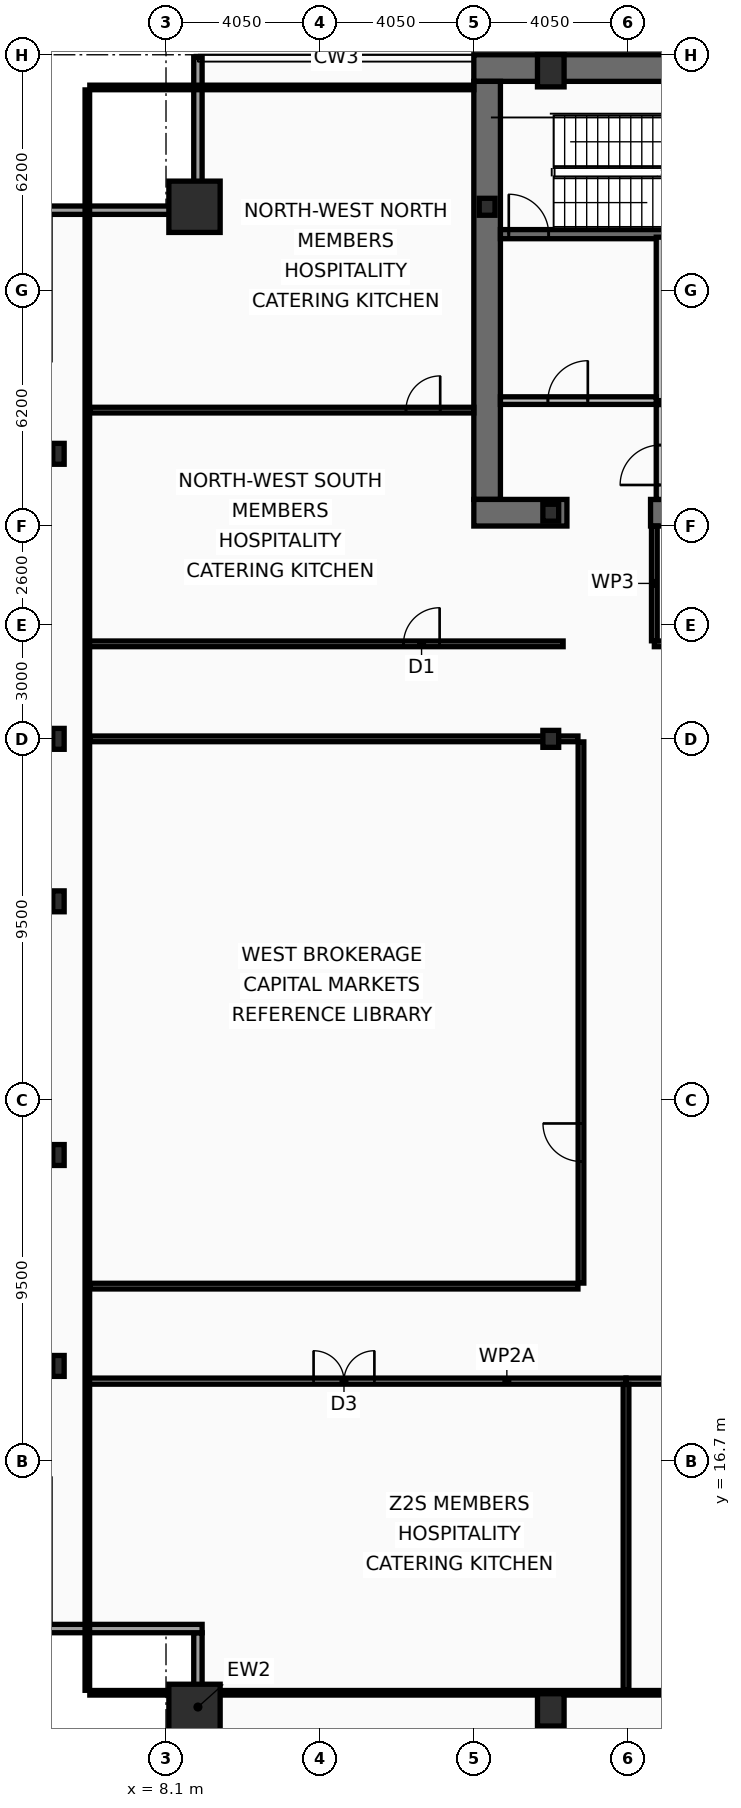
"""IFC4 building model, lengths in metres.
Left out: names, types, materials, properties, quantities, classifications, styles, units other than length and angle.
Written with IfcOpenShell. Run it as: python <this file> out.ifc"""

import sys

from ifc_helpers import new_model, si_unit, direction, frame, frame_2d, origin, origin_2d, place, context, subcontext, project, spatial, rectangle, hollow_rectangle, i_section, extrude, element, fill, save


model = new_model("IFC4")
c1 = context("Model", 3, precision=1e-05, world=origin(), true_north=direction((0.0, 1.0)))
c2 = subcontext(c1, "Body", "Model", "MODEL_VIEW")
j1 = project(units=[si_unit("LENGTHUNIT", "METRE"), si_unit("PLANEANGLEUNIT", "RADIAN")], contexts=[c1])
p1 = place(None, origin())
s1 = spatial("IfcSite", under=j1, at=p1, CompositionType="ELEMENT")
p2 = place(p1, origin())
s2 = spatial("IfcBuilding", under=s1, at=p2, CompositionType="ELEMENT")
p3 = place(p2, frame((0.0, 0.0, 147.0)))
s3 = spatial("IfcBuildingStorey", under=s2, at=p3, CompositionType="ELEMENT", Elevation=147.0)
p4 = place(p3, frame((16.2, 53.35, 0.0), z_axis=(0.0, 0.0, 1.0), x_axis=(1.0, 0.0, 0.0)))
e1 = element("IfcWall", 1, at=p4, inside=s3, PredefinedType="SHEAR", context=c2, shape_type="SweptSolid", body=[
    extrude(rectangle(XDim=40.5, YDim=0.7, at=frame_2d((20.25, 0.0))), origin(), (0.0, 0.0, 1.0), 3.44),
])
p5 = place(p3, frame((16.55, 42.0, 0.0), z_axis=(0.0, 0.0, 1.0), x_axis=(0.0, 1.0, 0.0)))
e2 = element("IfcWall", 2, at=p5, inside=s3, PredefinedType="SHEAR", context=c2, shape_type="SweptSolid", body=[
    extrude(rectangle(XDim=11.0, YDim=0.7, at=frame_2d((5.5, 0.0))), origin(), (0.0, 0.0, 1.0), 3.44),
])
p6 = place(p3, frame((18.65, 41.65, 0.0), z_axis=(0.0, 0.0, 1.0), x_axis=(-1.0, 0.0, 0.0)))
e3 = element("IfcWall", 3, at=p6, inside=s3, PredefinedType="SHEAR", context=c2, shape_type="SweptSolid", body=[
    extrude(rectangle(XDim=2.45, YDim=0.7, at=frame_2d((1.225, 0.0))), origin(), (0.0, 0.0, 1.0), 3.44),
])
p7 = place(p3, frame((32.3, 41.65, 0.0), z_axis=(0.0, 0.0, 1.0), x_axis=(-1.0, 0.0, 0.0)))
e4 = element("IfcWall", 4, at=p7, inside=s3, PredefinedType="SHEAR", context=c2, shape_type="SweptSolid", body=[
    extrude(rectangle(XDim=11.45, YDim=0.7, at=frame_2d((5.725, 0.0))), origin(), (0.0, 0.0, 1.0), 3.44),
])
p8 = place(p3, frame((16.9, 48.98, 0.0), z_axis=(0.0, 0.0, 1.0), x_axis=(1.0, 0.0, 0.0)))
e5 = element("IfcWall", 5, at=p8, inside=s3, PredefinedType="SHEAR", context=c2, shape_type="SweptSolid", body=[
    extrude(rectangle(XDim=7.32, YDim=0.24, at=frame_2d((3.66, 0.0))), origin(), (0.0, 0.0, 1.0), 3.44),
])
p9 = place(p8, frame((0.22, 0.0, 0.0)))
e6 = element("IfcOpeningElement", 6, at=p9, cuts=e5, PredefinedType="OPENING", context=c2, shape_type="SweptSolid", body=[
    extrude(rectangle(XDim=1.05, YDim=2.15, at=frame_2d((0.525, 1.075))), frame((0.0, 0.13, 0.0), z_axis=(0.0, -1.0, 0.0), x_axis=(1.0, 0.0, 0.0)), (0.0, 0.0, 1.0), 0.26),
])
for number, where, z_axis, x_axis in (
    (7, (8.85, 10.15, 0.0), (0.0, 0.0, 1.0), (1.0, 0.0, 0.0)),
    (8, (8.85, 49.7, 0.0), (0.0, 0.0, 1.0), (1.0, 0.0, 0.0)),
):
    element("IfcColumn", number, at=place(p3, frame(where, z_axis=z_axis, x_axis=x_axis)), inside=s3, PredefinedType="COLUMN", context=c2, shape_type="SweptSolid", body=[
        extrude(hollow_rectangle(XDim=1.35, YDim=1.35, WallThickness=0.065, at=origin_2d()), origin(), (0.0, 0.0, 1.0), 3.6),
    ])
for number, where, z_axis, x_axis in (
    (9, (18.225, 10.15, 0.0), (0.0, 0.0, 1.0), (1.0, 0.0, 0.0)),
    (10, (18.225, 53.28, 0.0), (0.0, 0.0, 1.0), (1.0, 0.0, 0.0)),
):
    element("IfcColumn", number, at=place(p3, frame(where, z_axis=z_axis, x_axis=x_axis)), inside=s3, PredefinedType="COLUMN", context=c2, shape_type="SweptSolid", body=[
        extrude(hollow_rectangle(XDim=0.7, YDim=0.85, WallThickness=0.05, at=origin_2d()), origin(), (0.0, 0.0, 1.0), 3.6),
    ])
for number, where, z_axis, x_axis in (
    (11, (5.27, 19.2, 0.0), (0.0, 0.0, 1.0), (1.0, 0.0, 0.0)),
    (12, (5.27, 24.75, 0.0), (0.0, 0.0, 1.0), (1.0, 0.0, 0.0)),
    (13, (5.27, 31.425, 0.0), (0.0, 0.0, 1.0), (1.0, 0.0, 0.0)),
    (14, (5.27, 35.7, 0.0), (0.0, 0.0, 1.0), (1.0, 0.0, 0.0)),
    (15, (5.27, 43.2, 0.0), (0.0, 0.0, 1.0), (1.0, 0.0, 0.0)),
):
    element("IfcColumn", number, at=place(p3, frame(where, z_axis=z_axis, x_axis=x_axis)), inside=s3, PredefinedType="COLUMN", context=c2, shape_type="SweptSolid", body=[
        extrude(i_section(OverallWidth=0.3, OverallDepth=0.55, WebThickness=0.015, FlangeThickness=0.029, at=origin_2d()), origin(), (0.0, 0.0, 1.0), 3.6),
    ])
for number, where, z_axis, x_axis in (
    (16, (16.55, 49.7, 0.0), (0.0, 0.0, 1.0), (1.0, 0.0, 0.0)),
    (17, (18.225, 35.7, 0.0), (0.0, 0.0, 1.0), (1.0, 0.0, 0.0)),
    (18, (18.225, 41.65, 0.0), (0.0, 0.0, 1.0), (1.0, 0.0, 0.0)),
):
    element("IfcColumn", number, at=place(p3, frame(where, z_axis=z_axis, x_axis=x_axis)), inside=s3, PredefinedType="COLUMN", context=c2, shape_type="SweptSolid", body=[
        extrude(i_section(OverallWidth=0.416, OverallDepth=0.446, WebThickness=0.039, FlangeThickness=0.063, at=origin_2d()), origin(), (0.0, 0.0, 1.0), 3.6),
    ])
p10 = place(p3, frame((8.94, 8.27, 0.0), z_axis=(0.0, 0.0, 1.0), x_axis=(0.0, 1.0, 0.0)))
e19 = element("IfcWall", 19, at=p10, inside=s3, PredefinedType="SOLIDWALL", context=c2, shape_type="SweptSolid", body=[
    extrude(rectangle(XDim=3.91, YDim=0.22, at=frame_2d((1.955, 0.0))), origin(), (0.0, 0.0, 1.0), 2.83),
])
for number, where, z_axis, x_axis in (
    (20, (9.05, 12.29, 0.0), (0.0, 0.0, 1.0), (-1.0, 0.0, 0.0)),
    (21, (4.83, 49.61, 0.0), (0.0, 0.0, 1.0), (1.0, 0.0, 0.0)),
):
    element("IfcWall", number, at=place(p3, frame(where, z_axis=z_axis, x_axis=x_axis)), inside=s3, PredefinedType="SOLIDWALL", context=c2, shape_type="SweptSolid", body=[
        extrude(rectangle(XDim=4.22, YDim=0.22, at=frame_2d((2.11, 0.0))), origin(), (0.0, 0.0, 1.0), 2.83),
    ])
p11 = place(p3, frame((8.94, 49.72, 0.0), z_axis=(0.0, 0.0, 1.0), x_axis=(0.0, 1.0, 0.0)))
e22 = element("IfcWall", 22, at=p11, inside=s3, PredefinedType="SOLIDWALL", context=c2, shape_type="SweptSolid", body=[
    extrude(rectangle(XDim=3.91, YDim=0.22, at=frame_2d((1.955, 0.0))), origin(), (0.0, 0.0, 1.0), 2.83),
])
p12 = place(p3, frame((21.1, 44.6, 0.0), z_axis=(0.0, 0.0, 1.0), x_axis=(0.0, 1.0, 0.0)))
e23 = element("IfcWall", 23, at=p12, inside=s3, PredefinedType="PARTITIONING", context=c2, shape_type="SweptSolid", body=[
    extrude(rectangle(XDim=4.3, YDim=0.2, at=frame_2d((2.15, 0.0))), origin(), (0.0, 0.0, 1.0), 3.44),
])
p13 = place(p3, frame((16.9, 44.6, 0.0), z_axis=(0.0, 0.0, 1.0), x_axis=(1.0, 0.0, 0.0)))
e24 = element("IfcWall", 24, at=p13, inside=s3, PredefinedType="PARTITIONING", context=c2, shape_type="SweptSolid", body=[
    extrude(rectangle(XDim=4.1, YDim=0.2, at=frame_2d((2.05, 0.0))), origin(), (0.0, 0.0, 1.0), 3.44),
])
p14 = place(p13, frame((1.25, 0.0, 0.0)))
e25 = element("IfcOpeningElement", 25, at=p14, cuts=e24, PredefinedType="OPENING", context=c2, shape_type="SweptSolid", body=[
    extrude(rectangle(XDim=1.05, YDim=2.15, at=frame_2d((0.525, 1.075))), frame((0.0, 0.11, 0.0), z_axis=(0.0, -1.0, 0.0), x_axis=(1.0, 0.0, 0.0)), (0.0, 0.0, 1.0), 0.22),
])
p15 = place(p3, frame((21.1, 42.0, 0.0), z_axis=(0.0, 0.0, 1.0), x_axis=(0.0, 1.0, 0.0)))
e26 = element("IfcWall", 26, at=p15, inside=s3, PredefinedType="PARTITIONING", context=c2, shape_type="SweptSolid", body=[
    extrude(rectangle(XDim=2.495, YDim=0.2, at=frame_2d((1.248, 0.0))), origin(), (0.0, 0.0, 1.0), 3.44),
])
p16 = place(p15, frame((0.38, 0.0, 0.0)))
e27 = element("IfcOpeningElement", 27, at=p16, cuts=e26, PredefinedType="OPENING", context=c2, shape_type="SweptSolid", body=[
    extrude(rectangle(XDim=1.05, YDim=2.15, at=frame_2d((0.525, 1.075))), frame((0.0, 0.11, 0.0), z_axis=(0.0, -1.0, 0.0), x_axis=(1.0, 0.0, 0.0)), (0.0, 0.0, 1.0), 0.22),
])
p17 = place(p3, frame((20.95, 38.2, 0.0), z_axis=(0.0, 0.0, 1.0), x_axis=(1.0, 0.0, 0.0)))
e28 = element("IfcWall", 28, at=p17, inside=s3, PredefinedType="PARTITIONING", context=c2, shape_type="SweptSolid", body=[
    extrude(rectangle(XDim=4.55, YDim=0.15, at=frame_2d((2.275, 0.0))), origin(), (0.0, 0.0, 1.0), 2.73),
])
p18 = place(p17, frame((0.9, 0.0, 0.0)))
e29 = element("IfcOpeningElement", 29, at=p18, cuts=e28, PredefinedType="OPENING", context=c2, shape_type="SweptSolid", body=[
    extrude(rectangle(XDim=0.95, YDim=2.05, at=frame_2d((0.475, 1.025))), frame((0.0, 0.085, 0.0), z_axis=(0.0, -1.0, 0.0), x_axis=(1.0, 0.0, 0.0)), (0.0, 0.0, 1.0), 0.17),
])
p19 = place(p3, frame((20.95, 38.28, 0.0), z_axis=(0.0, 0.0, 1.0), x_axis=(0.0, 1.0, 0.0)))
e30 = element("IfcWall", 30, at=p19, inside=s3, PredefinedType="PARTITIONING", context=c2, shape_type="SweptSolid", body=[
    extrude(rectangle(XDim=3.02, YDim=0.15, at=frame_2d((1.51, 0.0))), origin(), (0.0, 0.0, 1.0), 3.44),
])
p20 = place(p3, frame((6.03, 38.2, 0.0), z_axis=(0.0, 0.0, 1.0), x_axis=(1.0, 0.0, 0.0)))
e31 = element("IfcWall", 31, at=p20, inside=s3, PredefinedType="PARTITIONING", context=c2, shape_type="SweptSolid", body=[
    extrude(rectangle(XDim=12.52, YDim=0.15, at=frame_2d((6.26, 0.0))), origin(), (0.0, 0.0, 1.0), 2.73),
])
p21 = place(p20, frame((8.32, 0.0, 0.0)))
e32 = element("IfcOpeningElement", 32, at=p21, cuts=e31, PredefinedType="OPENING", context=c2, shape_type="SweptSolid", body=[
    extrude(rectangle(XDim=0.95, YDim=2.05, at=frame_2d((0.475, 1.025))), frame((0.0, 0.085, 0.0), z_axis=(0.0, -1.0, 0.0), x_axis=(1.0, 0.0, 0.0)), (0.0, 0.0, 1.0), 0.17),
])
p22 = place(p3, frame((6.095, 44.35, 0.0), z_axis=(0.0, 0.0, 1.0), x_axis=(1.0, 0.0, 0.0)))
e33 = element("IfcWall", 33, at=p22, inside=s3, PredefinedType="PARTITIONING", context=c2, shape_type="SweptSolid", body=[
    extrude(rectangle(XDim=10.105, YDim=0.15, at=frame_2d((5.052, 0.0))), origin(), (0.0, 0.0, 1.0), 2.83),
])
p23 = place(p22, frame((8.32, 0.0, 0.0)))
e34 = element("IfcOpeningElement", 34, at=p23, cuts=e33, PredefinedType="OPENING", context=c2, shape_type="SweptSolid", body=[
    extrude(rectangle(XDim=0.9, YDim=2.05, at=frame_2d((0.45, 1.025))), frame((0.0, 0.085, 0.0), z_axis=(0.0, -1.0, 0.0), x_axis=(1.0, 0.0, 0.0)), (0.0, 0.0, 1.0), 0.17),
])
p24 = place(p3, frame((6.03, 18.8, 0.0), z_axis=(0.0, 0.0, 1.0), x_axis=(1.0, 0.0, 0.0)))
e35 = element("IfcWall", 35, at=p24, inside=s3, PredefinedType="PARTITIONING", context=c2, shape_type="SweptSolid", body=[
    extrude(rectangle(XDim=14.175, YDim=0.16, at=frame_2d((7.087, 0.0))), origin(), (0.0, 0.0, 1.0), 2.73),
])
p25 = place(p24, frame((5.953, 0.0, 0.0)))
e36 = element("IfcOpeningElement", 36, at=p25, cuts=e35, PredefinedType="OPENING", context=c2, shape_type="SweptSolid", body=[
    extrude(rectangle(XDim=1.6, YDim=2.15, at=frame_2d((0.8, 1.075))), frame((0.0, 0.09, 0.0), z_axis=(0.0, -1.0, 0.0), x_axis=(1.0, 0.0, 0.0)), (0.0, 0.0, 1.0), 0.18),
])
p26 = place(p3, frame((20.205, 18.8, 0.0), z_axis=(0.0, 0.0, 1.0), x_axis=(1.0, 0.0, 0.0)))
e37 = element("IfcWall", 37, at=p26, inside=s3, PredefinedType="PARTITIONING", context=c2, shape_type="SweptSolid", body=[
    extrude(rectangle(XDim=9.831, YDim=0.16, at=frame_2d((4.916, 0.0))), origin(), (0.0, 0.0, 1.0), 2.73),
])
p27 = place(p26, frame((4.129, 0.0, 0.0)))
e38 = element("IfcOpeningElement", 38, at=p27, cuts=e37, PredefinedType="OPENING", context=c2, shape_type="SweptSolid", body=[
    extrude(rectangle(XDim=1.0, YDim=2.05, at=frame_2d((0.5, 1.025))), frame((0.0, 0.09, 0.0), z_axis=(0.0, -1.0, 0.0), x_axis=(1.0, 0.0, 0.0)), (0.0, 0.0, 1.0), 0.18),
])
p28 = place(p3, frame((20.205, 10.665, 0.0), z_axis=(0.0, 0.0, 1.0), x_axis=(0.0, 1.0, 0.0)))
e39 = element("IfcWall", 39, at=p28, inside=s3, PredefinedType="PARTITIONING", context=c2, shape_type="SweptSolid", body=[
    extrude(rectangle(XDim=8.05, YDim=0.15, at=frame_2d((4.025, 0.0))), origin(), (0.0, 0.0, 1.0), 2.93),
])
p29 = place(p3, frame((19.02, 21.38, 0.0), z_axis=(0.0, 0.0, 1.0), x_axis=(0.0, 1.0, 0.0)))
e40 = element("IfcWall", 40, at=p29, inside=s3, PredefinedType="PARTITIONING", context=c2, shape_type="SweptSolid", body=[
    extrude(rectangle(XDim=14.24, YDim=0.15, at=frame_2d((7.12, 0.0))), origin(), (0.0, 0.0, 1.0), 2.93),
])
p30 = place(p29, frame((3.2, 0.0, 0.0)))
e41 = element("IfcOpeningElement", 41, at=p30, cuts=e40, PredefinedType="OPENING", context=c2, shape_type="SweptSolid", body=[
    extrude(rectangle(XDim=1.0, YDim=2.05, at=frame_2d((0.5, 1.025))), frame((0.0, 0.085, 0.0), z_axis=(0.0, -1.0, 0.0), x_axis=(1.0, 0.0, 0.0)), (0.0, 0.0, 1.0), 0.17),
])
for number, where, z_axis, x_axis in (
    (42, (6.095, 21.3, 0.0), (0.0, 0.0, 1.0), (1.0, 0.0, 0.0)),
    (43, (6.095, 35.7, 0.0), (0.0, 0.0, 1.0), (1.0, 0.0, 0.0)),
):
    element("IfcWall", number, at=place(p3, frame(where, z_axis=z_axis, x_axis=x_axis)), inside=s3, PredefinedType="PARTITIONING", context=c2, shape_type="SweptSolid", body=[
        extrude(rectangle(XDim=12.845, YDim=0.15, at=frame_2d((6.422, 0.0))), origin(), (0.0, 0.0, 1.0), 2.73),
    ])
p31 = place(p3, frame((6.03, 10.665, 0.0), z_axis=(0.0, 0.0, 1.0), x_axis=(0.0, 1.0, 0.0)))
e44 = element("IfcWall", 44, at=p31, inside=s3, PredefinedType="PARTITIONING", context=c2, shape_type="SweptSolid", body=[
    extrude(rectangle(XDim=42.11, YDim=0.12, at=frame_2d((21.055, 0.0))), origin(), (0.0, 0.0, 1.0), 2.73),
])
p32 = place(p3, frame((6.095, 52.84, 0.0), z_axis=(0.0, 0.0, 1.0), x_axis=(1.0, 0.0, 0.0)))
e45 = element("IfcWall", 45, at=p32, inside=s3, PredefinedType="PARTITIONING", context=c2, shape_type="SweptSolid", body=[
    extrude(rectangle(XDim=10.105, YDim=0.12, at=frame_2d((5.052, 0.0))), origin(), (0.0, 0.0, 1.0), 3.44),
])
p33 = place(p3, frame((6.095, 10.6, 0.0), z_axis=(0.0, 0.0, 1.0), x_axis=(1.0, 0.0, 0.0)))
e46 = element("IfcWall", 46, at=p33, inside=s3, PredefinedType="PARTITIONING", context=c2, shape_type="SweptSolid", body=[
    extrude(rectangle(XDim=60.71, YDim=0.12, at=frame_2d((30.355, 0.0))), origin(), (0.0, 0.0, 1.0), 2.73),
])
p34 = place(p9, origin())
e47 = element("IfcDoor", 47, at=p34, inside=s3, OperationType="SINGLE_SWING_LEFT", PredefinedType="DOOR", context=c2, shape_type="SweptSolid", body=[
    extrude(rectangle(XDim=1.05, YDim=2.15, at=frame_2d((0.525, 1.075))), frame((0.0, 0.025, 0.0), z_axis=(0.0, -1.0, 0.0), x_axis=(1.0, 0.0, 0.0)), (0.0, 0.0, 1.0), 0.05),
])
fill(e6, e47)
p35 = place(p14, origin())
e48 = element("IfcDoor", 48, at=p35, inside=s3, OperationType="SINGLE_SWING_RIGHT", PredefinedType="DOOR", context=c2, shape_type="SweptSolid", body=[
    extrude(rectangle(XDim=1.05, YDim=2.15, at=frame_2d((0.525, 1.075))), frame((0.0, 0.025, 0.0), z_axis=(0.0, -1.0, 0.0), x_axis=(1.0, 0.0, 0.0)), (0.0, 0.0, 1.0), 0.05),
])
fill(e25, e48)
p36 = place(p16, origin())
e49 = element("IfcDoor", 49, at=p36, inside=s3, OperationType="SINGLE_SWING_LEFT", PredefinedType="DOOR", context=c2, shape_type="SweptSolid", body=[
    extrude(rectangle(XDim=1.05, YDim=2.15, at=frame_2d((0.525, 1.075))), frame((0.0, 0.025, 0.0), z_axis=(0.0, -1.0, 0.0), x_axis=(1.0, 0.0, 0.0)), (0.0, 0.0, 1.0), 0.05),
])
fill(e27, e49)
p37 = place(p21, origin())
e50 = element("IfcDoor", 50, at=p37, inside=s3, OperationType="SINGLE_SWING_RIGHT", PredefinedType="DOOR", context=c2, shape_type="SweptSolid", body=[
    extrude(rectangle(XDim=0.95, YDim=2.05, at=frame_2d((0.475, 1.025))), frame((0.0, 0.025, 0.0), z_axis=(0.0, -1.0, 0.0), x_axis=(1.0, 0.0, 0.0)), (0.0, 0.0, 1.0), 0.05),
])
fill(e32, e50)
p38 = place(p23, origin())
e51 = element("IfcDoor", 51, at=p38, inside=s3, OperationType="SINGLE_SWING_RIGHT", PredefinedType="DOOR", context=c2, shape_type="SweptSolid", body=[
    extrude(rectangle(XDim=0.9, YDim=2.05, at=frame_2d((0.45, 1.025))), frame((0.0, 0.025, 0.0), z_axis=(0.0, -1.0, 0.0), x_axis=(1.0, 0.0, 0.0)), (0.0, 0.0, 1.0), 0.05),
])
fill(e34, e51)
p39 = place(p25, origin())
e52 = element("IfcDoor", 52, at=p39, inside=s3, OperationType="DOUBLE_DOOR_SINGLE_SWING", PredefinedType="DOOR", context=c2, shape_type="SweptSolid", body=[
    extrude(rectangle(XDim=1.6, YDim=2.15, at=frame_2d((0.8, 1.075))), frame((0.0, 0.025, 0.0), z_axis=(0.0, -1.0, 0.0), x_axis=(1.0, 0.0, 0.0)), (0.0, 0.0, 1.0), 0.05),
])
fill(e36, e52)
p40 = place(p30, origin())
e53 = element("IfcDoor", 53, at=p40, inside=s3, OperationType="SINGLE_SWING_RIGHT", PredefinedType="DOOR", context=c2, shape_type="SweptSolid", body=[
    extrude(rectangle(XDim=1.0, YDim=2.05, at=frame_2d((0.5, 1.025))), frame((0.0, 0.025, 0.0), z_axis=(0.0, -1.0, 0.0), x_axis=(1.0, 0.0, 0.0)), (0.0, 0.0, 1.0), 0.05),
])
fill(e41, e53)
save(model, sys.argv[1])
